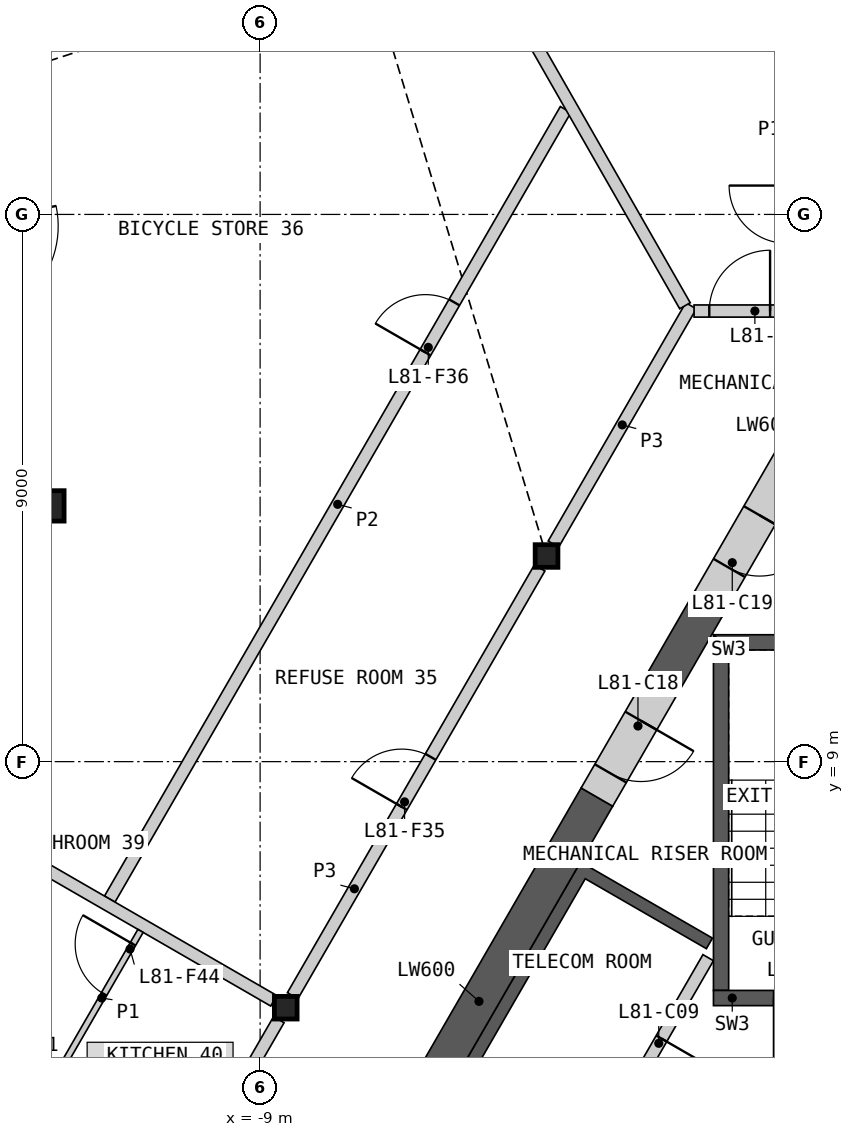
"""IFC4 building model, lengths in metres.
Left out: names, types, materials, properties, quantities, classifications, styles, units other than length and angle.
Written with IfcOpenShell. Run it as: python <this file> out.ifc"""

import sys

from ifc_helpers import new_model, si_unit, direction, frame, frame_2d, origin, origin_2d, place, context, subcontext, project, spatial, polyline, rectangle, hollow_rectangle, i_section, outline, extrude, element, fill, save


model = new_model("IFC4")
c1 = context("Model", 3, precision=1e-05, world=origin(), true_north=direction((0.0, 1.0)))
c2 = subcontext(c1, "Body", "Model", "MODEL_VIEW")
j1 = project(units=[si_unit("LENGTHUNIT", "METRE"), si_unit("PLANEANGLEUNIT", "RADIAN")], contexts=[c1])
p1 = place(None, origin())
s1 = spatial("IfcSite", under=j1, at=p1, CompositionType="ELEMENT")
p2 = place(p1, origin())
s2 = spatial("IfcBuilding", under=s1, at=p2, CompositionType="ELEMENT")
p3 = place(p2, frame((0.0, 0.0, 364.4)))
s3 = spatial("IfcBuildingStorey", under=s2, at=p3, CompositionType="ELEMENT", Elevation=364.4)
p4 = place(p3, frame((-12.474, 13.206, 0.0), z_axis=(0.0, 0.0, 1.0), x_axis=(1.0, 0.0, 0.0)))
e1 = element("IfcColumn", 1, at=p4, inside=s3, PredefinedType="COLUMN", context=c2, shape_type="SweptSolid", body=[
    extrude(hollow_rectangle(XDim=0.5, YDim=0.5, WallThickness=0.03, at=origin_2d()), origin(), (0.0, 0.0, 1.0), 3.4),
])
for number, where, z_axis, x_axis in (
    (2, (-4.289, 12.382, 0.0), (0.0, 0.0, 1.0), (1.0, 0.0, 0.0)),
    (3, (-8.578, 4.953, 0.0), (0.0, 0.0, 1.0), (1.0, 0.0, 0.0)),
):
    element("IfcColumn", number, at=place(p3, frame(where, z_axis=z_axis, x_axis=x_axis)), inside=s3, PredefinedType="COLUMN", context=c2, shape_type="SweptSolid", body=[
        extrude(i_section(OverallWidth=0.374, OverallDepth=0.372, WebThickness=0.016, FlangeThickness=0.026, at=origin_2d()), origin(), (0.0, 0.0, 1.0), 3.4),
    ])
p5 = place(p3, origin())
e4 = element("IfcWall", 4, at=p5, inside=s3, PredefinedType="SHEAR", context=c2, shape_type="SweptSolid", body=[
    extrude(outline(polyline([(-4.96, 0.208), (-7.131, 1.461), (-3.731, 7.35), (-1.561, 6.097), (-1.66, 5.924), (-3.652, 7.074), (-5.752, 3.437), (-3.76, 2.287), (-3.861, 2.113), (-5.852, 3.263), (-6.852, 1.531), (-4.861, 0.381), (-4.96, 0.208)])), origin(), (0.0, 0.0, 1.0), 3.1),
])
p6 = place(p3, frame((-1.631, 5.776, 0.0), z_axis=(0.0, 0.0, 1.0), x_axis=(-0.499992876559, -0.866029516466, 0.0)))
e5 = element("IfcWall", 5, at=p6, inside=s3, PredefinedType="SOLIDWALL", context=c2, shape_type="SweptSolid", body=[
    extrude(rectangle(XDim=6.486, YDim=0.2, at=frame_2d((3.243, 0.0))), origin(), (0.0, 0.0, 1.0), 3.1),
])
p7 = place(p6, frame((1.537, 0.0, 0.0)))
e6 = element("IfcOpeningElement", 6, at=p7, cuts=e5, PredefinedType="OPENING", context=c2, shape_type="SweptSolid", body=[
    extrude(rectangle(XDim=0.9, YDim=2.1, at=frame_2d((0.45, 1.05))), frame((0.0, 0.11, 0.0), z_axis=(0.0, -1.0, 0.0), x_axis=(1.0, 0.0, 0.0)), (0.0, 0.0, 1.0), 0.22),
])
p8 = place(p6, frame((4.837, 0.0, 0.0)))
e7 = element("IfcOpeningElement", 7, at=p8, cuts=e5, PredefinedType="OPENING", context=c2, shape_type="SweptSolid", body=[
    extrude(rectangle(XDim=0.9, YDim=2.1, at=frame_2d((0.45, 1.05))), frame((0.0, 0.11, 0.0), z_axis=(0.0, -1.0, 0.0), x_axis=(1.0, 0.0, 0.0)), (0.0, 0.0, 1.0), 0.22),
])
p9 = place(p3, origin())
e8 = element("IfcWall", 8, at=p9, inside=s3, PredefinedType="SHEAR", context=c2, shape_type="SweptSolid", body=[
    extrude(outline(polyline([(1.544, 11.087), (-1.544, 11.087), (-1.294, 10.837), (1.294, 10.837), (1.544, 11.087)])), origin(), (0.0, 0.0, 1.0), 3.1),
])
p10 = place(p3, origin())
e9 = element("IfcWall", 9, at=p10, inside=s3, PredefinedType="SHEAR", context=c2, shape_type="SweptSolid", body=[
    extrude(outline(polyline([(-1.294, 10.837), (-1.544, 11.087), (-1.544, 5.237), (-1.294, 5.237), (-1.294, 10.837)])), origin(), (0.0, 0.0, 1.0), 3.1),
])
p11 = place(p3, frame((1.544, 5.112, 0.0), z_axis=(0.0, 0.0, 1.0), x_axis=(-1.0, 0.0, 0.0)))
e10 = element("IfcWall", 10, at=p11, inside=s3, PredefinedType="SHEAR", context=c2, shape_type="SweptSolid", body=[
    extrude(rectangle(XDim=3.088, YDim=0.25, at=frame_2d((1.544, 0.0))), origin(), (0.0, 0.0, 1.0), 3.1),
])
p12 = place(p11, frame((0.994, 0.0, 0.0)))
e11 = element("IfcOpeningElement", 11, at=p12, cuts=e10, PredefinedType="OPENING", context=c2, shape_type="SweptSolid", body=[
    extrude(rectangle(XDim=1.1, YDim=2.1, at=frame_2d((0.55, 1.05))), frame((0.0, 0.135, 0.0), z_axis=(0.0, -1.0, 0.0), x_axis=(1.0, 0.0, 0.0)), (0.0, 0.0, 1.0), 0.27),
])
p13 = place(p3, frame((-3.461, 8.417, 0.0), z_axis=(0.0, 0.0, 1.0), x_axis=(-0.50000391502, -0.866023143435, 0.0)))
e12 = element("IfcWall", 12, at=p13, inside=s3, PredefinedType="SHEAR", context=c2, shape_type="SweptSolid", body=[
    extrude(rectangle(XDim=7.759, YDim=0.6, at=frame_2d((3.879, 0.0))), origin(), (0.0, 0.0, 1.0), 3.1),
])
p14 = place(p3, frame((-1.59, 11.658, 0.0), z_axis=(0.0, 0.0, 1.0), x_axis=(-0.500037594623, -0.866003697431, 0.0)))
e13 = element("IfcWall", 13, at=p14, inside=s3, PredefinedType="SHEAR", context=c2, shape_type="SweptSolid", body=[
    extrude(rectangle(XDim=1.542, YDim=0.6, at=frame_2d((0.771, 0.0))), origin(), (0.0, 0.0, 1.0), 3.1),
])
p15 = place(p3, frame((-2.361, 10.322, 0.0), z_axis=(0.0, 0.0, 1.0), x_axis=(-0.499946605688, -0.86605622881, 0.0)))
e14 = element("IfcWall", 14, at=p15, inside=s3, PredefinedType="SHEAR", context=c2, shape_type="SweptSolid", body=[
    extrude(rectangle(XDim=2.2, YDim=0.6, at=frame_2d((1.1, 0.0))), origin(), (0.0, 0.0, 1.0), 3.1),
])
p16 = place(p15, frame((0.75, 0.0, 0.0)))
e15 = element("IfcOpeningElement", 15, at=p16, cuts=e14, PredefinedType="OPENING", context=c2, shape_type="SweptSolid", body=[
    extrude(rectangle(XDim=1.0, YDim=2.1, at=frame_2d((0.5, 1.05))), frame((0.0, 0.31, 0.0), z_axis=(0.0, -1.0, 0.0), x_axis=(1.0, 0.0, 0.0)), (0.0, 0.0, 1.0), 0.62),
])
p17 = place(p3, frame((-0.26, 13.961, 0.0), z_axis=(0.0, 0.0, 1.0), x_axis=(-0.49997936161, -0.866037319036, 0.0)))
e16 = element("IfcWall", 16, at=p17, inside=s3, PredefinedType="SHEAR", context=c2, shape_type="SweptSolid", body=[
    extrude(rectangle(XDim=2.66, YDim=0.6, at=frame_2d((1.33, 0.0))), origin(), (0.0, 0.0, 1.0), 3.1),
])
p18 = place(p17, frame((1.05, 0.0, 0.0)))
e17 = element("IfcOpeningElement", 17, at=p18, cuts=e16, PredefinedType="OPENING", context=c2, shape_type="SweptSolid", body=[
    extrude(rectangle(XDim=1.0, YDim=2.1, at=frame_2d((0.5, 1.05))), frame((0.0, 0.31, 0.0), z_axis=(0.0, -1.0, 0.0), x_axis=(1.0, 0.0, 0.0)), (0.0, 0.0, 1.0), 0.62),
])
p19 = place(p3, frame((-8.465, 5.15, 0.0), z_axis=(0.0, 0.0, 1.0), x_axis=(0.499992155518, 0.866029932751, 0.0)))
e18 = element("IfcWall", 18, at=p19, inside=s3, PredefinedType="PARTITIONING", context=c2, shape_type="SweptSolid", body=[
    extrude(rectangle(XDim=8.123, YDim=0.2, at=frame_2d((4.062, 0.0))), origin(), (0.0, 0.0, 1.0), 3.1),
])
p20 = place(p19, frame((3.587, 0.0, 0.0)))
e19 = element("IfcOpeningElement", 19, at=p20, cuts=e18, PredefinedType="OPENING", context=c2, shape_type="SweptSolid", body=[
    extrude(rectangle(XDim=0.95, YDim=2.1, at=frame_2d((0.475, 1.05))), frame((0.0, 0.11, 0.0), z_axis=(0.0, -1.0, 0.0), x_axis=(1.0, 0.0, 0.0)), (0.0, 0.0, 1.0), 0.22),
])
p21 = place(p3, frame((-12.754, -2.279, 0.0), z_axis=(0.0, 0.0, 1.0), x_axis=(0.500001682468, 0.866024432409, 0.0)))
e20 = element("IfcWall", 20, at=p21, inside=s3, PredefinedType="PARTITIONING", context=c2, shape_type="SweptSolid", body=[
    extrude(rectangle(XDim=8.124, YDim=0.2, at=frame_2d((4.062, 0.0))), origin(), (0.0, 0.0, 1.0), 3.1),
])
p22 = place(p21, frame((3.762, 0.0, 0.0)))
e21 = element("IfcOpeningElement", 21, at=p22, cuts=e20, PredefinedType="OPENING", context=c2, shape_type="SweptSolid", body=[
    extrude(rectangle(XDim=1.0, YDim=2.1, at=frame_2d((0.5, 1.05))), frame((0.0, 0.11, 0.0), z_axis=(0.0, -1.0, 0.0), x_axis=(1.0, 0.0, 0.0)), (0.0, 0.0, 1.0), 0.22),
])
p23 = place(p3, frame((-4.176, 12.579, 0.0), z_axis=(0.0, 0.0, 1.0), x_axis=(0.499974648164, 0.866040040179, 0.0)))
e22 = element("IfcWall", 22, at=p23, inside=s3, PredefinedType="PARTITIONING", context=c2, shape_type="SweptSolid", body=[
    extrude(rectangle(XDim=4.525, YDim=0.2, at=frame_2d((2.263, 0.0))), origin(), (0.0, 0.0, 1.0), 3.1),
])
p24 = place(p3, frame((-1.863, 16.411, 0.0), z_axis=(0.0, 0.0, 1.0), x_axis=(1.0, 0.0, 0.0)))
e23 = element("IfcWall", 23, at=p24, inside=s3, PredefinedType="PARTITIONING", context=c2, shape_type="SweptSolid", body=[
    extrude(rectangle(XDim=3.701, YDim=0.2, at=frame_2d((1.851, 0.0))), origin(), (0.0, 0.0, 1.0), 3.1),
])
p25 = place(p24, frame((0.25, 0.0, 0.0)))
e24 = element("IfcOpeningElement", 24, at=p25, cuts=e23, PredefinedType="OPENING", context=c2, shape_type="SweptSolid", body=[
    extrude(rectangle(XDim=1.0, YDim=2.1, at=frame_2d((0.5, 1.05))), frame((0.0, 0.11, 0.0), z_axis=(0.0, -1.0, 0.0), x_axis=(1.0, 0.0, 0.0)), (0.0, 0.0, 1.0), 0.22),
])
p26 = place(p3, frame((-11.473, 6.74, 0.0), z_axis=(0.0, 0.0, 1.0), x_axis=(0.499993542657, 0.866029131901, 0.0)))
e25 = element("IfcWall", 25, at=p26, inside=s3, PredefinedType="PARTITIONING", context=c2, shape_type="SweptSolid", body=[
    extrude(rectangle(XDim=14.994, YDim=0.2, at=frame_2d((7.497, 0.0))), origin(), (0.0, 0.0, 1.0), 2.33),
])
p27 = place(p26, frame((10.383, 0.0, 0.0)))
e26 = element("IfcOpeningElement", 26, at=p27, cuts=e25, PredefinedType="OPENING", context=c2, shape_type="SweptSolid", body=[
    extrude(rectangle(XDim=0.95, YDim=2.1, at=frame_2d((0.475, 1.05))), frame((0.0, 0.11, 0.0), z_axis=(0.0, -1.0, 0.0), x_axis=(1.0, 0.0, 0.0)), (0.0, 0.0, 1.0), 0.22),
])
p28 = place(p3, frame((-9.362, 29.352, 0.0), z_axis=(0.0, 0.0, 1.0), x_axis=(0.496351997927, -0.868121359116, 0.0)))
e27 = element("IfcWall", 27, at=p28, inside=s3, PredefinedType="PARTITIONING", context=c2, shape_type="SweptSolid", body=[
    extrude(rectangle(XDim=14.807, YDim=0.2, at=frame_2d((7.404, 0.0))), origin(), (0.0, 0.0, 1.0), 2.33),
])
p29 = place(p3, frame((-18.869, 10.894, 0.0), z_axis=(0.0, 0.0, 1.0), x_axis=(0.866023724155, -0.500002909193, 0.0)))
e28 = element("IfcWall", 28, at=p29, inside=s3, PredefinedType="PARTITIONING", context=c2, shape_type="SweptSolid", body=[
    extrude(rectangle(XDim=11.655, YDim=0.2, at=frame_2d((5.827, 0.0))), origin(), (0.0, 0.0, 1.0), 2.33),
])
p30 = place(p3, frame((-15.318, 5.38, 0.0), z_axis=(0.0, 0.0, 1.0), x_axis=(0.866035260786, -0.499982926783, 0.0)))
e29 = element("IfcWall", 29, at=p30, inside=s3, PredefinedType="PARTITIONING", context=c2, shape_type="SweptSolid", body=[
    extrude(rectangle(XDim=5.95, YDim=0.1, at=frame_2d((2.975, 0.0))), origin(), (0.0, 0.0, 1.0), 2.33),
])
p31 = place(p3, frame((-14.735, 5.389, 0.0), z_axis=(0.0, 0.0, 1.0), x_axis=(0.866032775405, -0.499987231761, 0.0)))
e30 = element("IfcWall", 30, at=p31, inside=s3, PredefinedType="PARTITIONING", context=c2, shape_type="SweptSolid", body=[
    extrude(rectangle(XDim=2.9, YDim=0.1, at=frame_2d((1.45, 0.0))), origin(), (0.0, 0.0, 1.0), 2.33),
])
p32 = place(p3, frame((-12.242, 4.008, 0.0), z_axis=(0.0, 0.0, 1.0), x_axis=(0.499948979701, 0.866054858364, 0.0)))
e31 = element("IfcWall", 31, at=p32, inside=s3, PredefinedType="PARTITIONING", context=c2, shape_type="SweptSolid", body=[
    extrude(rectangle(XDim=2.55, YDim=0.1, at=frame_2d((1.275, 0.0))), origin(), (0.0, 0.0, 1.0), 2.33),
])
p33 = place(p32, frame((1.35, 0.0, 0.0)))
e32 = element("IfcOpeningElement", 32, at=p33, cuts=e31, PredefinedType="OPENING", context=c2, shape_type="SweptSolid", body=[
    extrude(rectangle(XDim=0.95, YDim=2.1, at=frame_2d((0.475, 1.05))), frame((0.0, 0.06, 0.0), z_axis=(0.0, -1.0, 0.0), x_axis=(1.0, 0.0, 0.0)), (0.0, 0.0, 1.0), 0.12),
])
p34 = place(p7, origin())
e33 = element("IfcDoor", 33, at=p34, inside=s3, OperationType="SINGLE_SWING_LEFT", PredefinedType="DOOR", context=c2, shape_type="SweptSolid", body=[
    extrude(rectangle(XDim=0.9, YDim=2.1, at=frame_2d((0.45, 1.05))), frame((0.0, 0.025, 0.0), z_axis=(0.0, -1.0, 0.0), x_axis=(1.0, 0.0, 0.0)), (0.0, 0.0, 1.0), 0.05),
])
fill(e6, e33)
p35 = place(p12, origin())
e34 = element("IfcDoor", 34, at=p35, inside=s3, OperationType="SINGLE_SWING_RIGHT", PredefinedType="DOOR", context=c2, shape_type="SweptSolid", body=[
    extrude(rectangle(XDim=1.1, YDim=2.1, at=frame_2d((0.55, 1.05))), frame((0.0, 0.025, 0.0), z_axis=(0.0, -1.0, 0.0), x_axis=(1.0, 0.0, 0.0)), (0.0, 0.0, 1.0), 0.05),
])
fill(e11, e34)
p36 = place(p16, origin())
e35 = element("IfcDoor", 35, at=p36, inside=s3, OperationType="SINGLE_SWING_LEFT", PredefinedType="DOOR", context=c2, shape_type="SweptSolid", body=[
    extrude(rectangle(XDim=1.0, YDim=2.1, at=frame_2d((0.5, 1.05))), frame((0.0, 0.055, 0.0), z_axis=(0.0, -1.0, 0.0), x_axis=(1.0, 0.0, 0.0)), (0.0, 0.0, 1.0), 0.05),
])
fill(e15, e35)
p37 = place(p18, origin())
e36 = element("IfcDoor", 36, at=p37, inside=s3, OperationType="SINGLE_SWING_LEFT", PredefinedType="DOOR", context=c2, shape_type="SweptSolid", body=[
    extrude(rectangle(XDim=1.0, YDim=2.1, at=frame_2d((0.5, 1.05))), frame((0.0, 0.055, 0.0), z_axis=(0.0, -1.0, 0.0), x_axis=(1.0, 0.0, 0.0)), (0.0, 0.0, 1.0), 0.05),
])
fill(e17, e36)
p38 = place(p25, origin())
e37 = element("IfcDoor", 37, at=p38, inside=s3, OperationType="SINGLE_SWING_RIGHT", PredefinedType="DOOR", context=c2, shape_type="SweptSolid", body=[
    extrude(rectangle(XDim=1.0, YDim=2.1, at=frame_2d((0.5, 1.05))), frame((0.0, 0.025, 0.0), z_axis=(0.0, -1.0, 0.0), x_axis=(1.0, 0.0, 0.0)), (0.0, 0.0, 1.0), 0.05),
])
fill(e24, e37)
p39 = place(p20, origin())
e38 = element("IfcDoor", 38, at=p39, inside=s3, OperationType="SINGLE_SWING_LEFT", PredefinedType="DOOR", context=c2, shape_type="SweptSolid", body=[
    extrude(rectangle(XDim=0.95, YDim=2.1, at=frame_2d((0.475, 1.05))), frame((0.0, 0.025, 0.0), z_axis=(0.0, -1.0, 0.0), x_axis=(1.0, 0.0, 0.0)), (0.0, 0.0, 1.0), 0.05),
])
fill(e19, e38)
p40 = place(p27, origin())
e39 = element("IfcDoor", 39, at=p40, inside=s3, OperationType="SINGLE_SWING_LEFT", PredefinedType="DOOR", context=c2, shape_type="SweptSolid", body=[
    extrude(rectangle(XDim=0.95, YDim=2.1, at=frame_2d((0.475, 1.05))), frame((0.0, 0.025, 0.0), z_axis=(0.0, -1.0, 0.0), x_axis=(1.0, 0.0, 0.0)), (0.0, 0.0, 1.0), 0.05),
])
fill(e26, e39)
p41 = place(p33, origin())
e40 = element("IfcDoor", 40, at=p41, inside=s3, OperationType="SINGLE_SWING_RIGHT", PredefinedType="DOOR", context=c2, shape_type="SweptSolid", body=[
    extrude(rectangle(XDim=0.95, YDim=2.1, at=frame_2d((0.475, 1.05))), frame((0.0, 0.025, 0.0), z_axis=(0.0, -1.0, 0.0), x_axis=(1.0, 0.0, 0.0)), (0.0, 0.0, 1.0), 0.05),
])
fill(e32, e40)
save(model, sys.argv[1])
